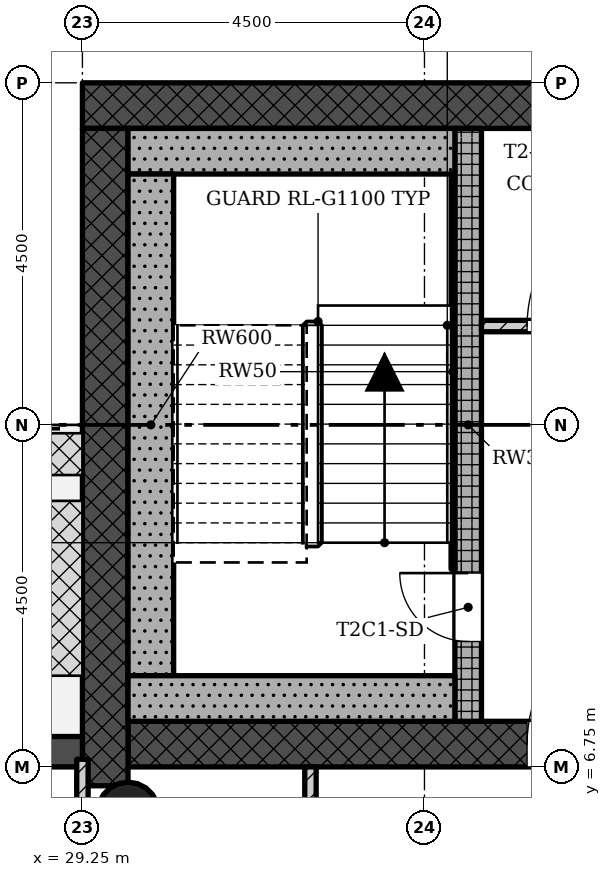
"""IFC4 building model, lengths in metres.
Left out: names, types, materials, properties, quantities, classifications, styles, units other than length and angle.
Written with IfcOpenShell. Run it as: python <this file> out.ifc"""

import sys

from ifc_helpers import new_model, si_unit, direction, frame, frame_2d, origin, origin_2d, place, context, subcontext, project, spatial, rectangle, hollow_circle, extrude, element, fill, save


model = new_model("IFC4")
c1 = context("Model", 3, precision=1e-05, world=origin(), true_north=direction((0.0, 1.0)))
c2 = subcontext(c1, "Body", "Model", "MODEL_VIEW")
j1 = project(units=[si_unit("LENGTHUNIT", "METRE"), si_unit("PLANEANGLEUNIT", "RADIAN")], contexts=[c1])
p1 = place(None, origin())
s1 = spatial("IfcSite", under=j1, at=p1, CompositionType="ELEMENT")
p2 = place(p1, origin())
s2 = spatial("IfcBuilding", under=s1, at=p2, CompositionType="ELEMENT")
p3 = place(p2, frame((0.0, 0.0, 242.4)))
s3 = spatial("IfcBuildingStorey", under=s2, at=p3, CompositionType="ELEMENT", Elevation=242.4)
p4 = place(p3, frame((29.85, 7.05, 0.0), z_axis=(0.0, 0.0, 1.0), x_axis=(1.0, 0.0, 0.0)))
e1 = element("IfcWall", 1, at=p4, inside=s3, PredefinedType="SHEAR", context=c2, shape_type="SweptSolid", body=[
    extrude(rectangle(XDim=12.9, YDim=0.6, at=frame_2d((6.45, 0.0))), origin(), (0.0, 0.0, 1.0), 4.5),
])
p5 = place(p4, frame((5.25, 0.0, 0.0)))
e2 = element("IfcOpeningElement", 2, at=p5, cuts=e1, PredefinedType="OPENING", context=c2, shape_type="SweptSolid", body=[
    extrude(rectangle(XDim=1.8, YDim=2.1, at=frame_2d((0.9, 1.05))), frame((0.0, 0.31, 0.0), z_axis=(0.0, -1.0, 0.0), x_axis=(1.0, 0.0, 0.0)), (0.0, 0.0, 1.0), 0.62),
])
p6 = place(p3, frame((42.15, 15.45, 0.0), z_axis=(0.0, 0.0, 1.0), x_axis=(-1.0, 0.0, 0.0)))
e3 = element("IfcWall", 3, at=p6, inside=s3, PredefinedType="SHEAR", context=c2, shape_type="SweptSolid", body=[
    extrude(rectangle(XDim=12.9, YDim=0.6, at=frame_2d((6.45, 0.0))), origin(), (0.0, 0.0, 1.0), 4.5),
])
p7 = place(p6, frame((5.7, 0.0, 0.45)))
e4 = element("IfcOpeningElement", 4, at=p7, cuts=e3, PredefinedType="OPENING", context=c2, shape_type="SweptSolid", body=[
    extrude(rectangle(XDim=0.9, YDim=2.4, at=frame_2d((0.45, 1.2))), frame((0.0, 0.31, 0.0), z_axis=(0.0, -1.0, 0.0), x_axis=(1.0, 0.0, 0.0)), (0.0, 0.0, 1.0), 0.62),
])
p8 = place(p3, frame((29.55, 15.15, 0.0), z_axis=(0.0, 0.0, 1.0), x_axis=(0.0, -1.0, 0.0)))
e5 = element("IfcWall", 5, at=p8, inside=s3, PredefinedType="SHEAR", context=c2, shape_type="SweptSolid", body=[
    extrude(rectangle(XDim=8.648, YDim=0.6, at=frame_2d((4.324, 0.0))), origin(), (0.0, 0.0, 1.0), 4.5),
])
p9 = place(p3, frame((34.325, 7.35, 0.0), z_axis=(0.0, 0.0, 1.0), x_axis=(0.0, 1.0, 0.0)))
e6 = element("IfcWall", 6, at=p9, inside=s3, PredefinedType="SHEAR", context=c2, shape_type="SweptSolid", body=[
    extrude(rectangle(XDim=7.8, YDim=0.35, at=frame_2d((3.9, 0.0))), origin(), (0.0, 0.0, 1.0), 4.5),
])
p10 = place(p9, frame((1.05, 0.0, 0.0)))
e7 = element("IfcOpeningElement", 7, at=p10, cuts=e6, PredefinedType="OPENING", context=c2, shape_type="SweptSolid", body=[
    extrude(rectangle(XDim=0.9, YDim=2.1, at=frame_2d((0.45, 1.05))), frame((0.0, 0.185, 0.0), z_axis=(0.0, -1.0, 0.0), x_axis=(1.0, 0.0, 0.0)), (0.0, 0.0, 1.0), 0.37),
])
p11 = place(p3, frame((29.85, 6.15, 0.0), z_axis=(0.0, 0.0, 1.0), x_axis=(1.0, 0.0, 0.0)))
e8 = element("IfcColumn", 8, at=p11, inside=s3, PredefinedType="COLUMN", context=c2, shape_type="SweptSolid", body=[
    extrude(hollow_circle(Radius=0.4, WallThickness=0.028, at=origin_2d()), origin(), (0.0, 0.0, 1.0), 4.5),
])
p12 = place(p3, frame((29.25, 6.95, -0.02), z_axis=(0.0, 0.0, 1.0), x_axis=(-1.0, 0.0, 0.0)))
e9 = element("IfcWall", 9, at=p12, inside=s3, PredefinedType="STANDARD", context=c2, shape_type="SweptSolid", body=[
    extrude(rectangle(XDim=4.5, YDim=0.4, at=frame_2d((2.25, 0.0))), origin(), (0.0, 0.0, 1.0), 4.22),
])
p13 = place(p12, frame((1.35, 0.0, 0.02)))
e10 = element("IfcOpeningElement", 10, at=p13, cuts=e9, PredefinedType="OPENING", context=c2, shape_type="SweptSolid", body=[
    extrude(rectangle(XDim=1.8, YDim=2.1, at=frame_2d((0.9, 1.05))), frame((0.0, 0.21, 0.0), z_axis=(0.0, -1.0, 0.0), x_axis=(1.0, 0.0, 0.0)), (0.0, 0.0, 1.0), 0.42),
])
p14 = place(p3, frame((37.5, 12.55, 0.0), z_axis=(0.0, 0.0, 1.0), x_axis=(-1.0, 0.0, 0.0)))
e11 = element("IfcWall", 11, at=p14, inside=s3, PredefinedType="PARTITIONING", context=c2, shape_type="SweptSolid", body=[
    extrude(rectangle(XDim=3.0, YDim=0.15, at=frame_2d((1.5, 0.0))), origin(), (0.0, 0.0, 1.0), 4.08),
])
p15 = place(p14, frame((0.6, 0.0, 0.0)))
e12 = element("IfcOpeningElement", 12, at=p15, cuts=e11, PredefinedType="OPENING", context=c2, shape_type="SweptSolid", body=[
    extrude(rectangle(XDim=1.8, YDim=2.1, at=frame_2d((0.9, 1.05))), frame((0.0, 0.085, 0.0), z_axis=(0.0, -1.0, 0.0), x_axis=(1.0, 0.0, 0.0)), (0.0, 0.0, 1.0), 0.17),
])
p16 = place(p3, frame((32.25, 2.25, 0.0), z_axis=(0.0, 0.0, 1.0), x_axis=(0.0, 1.0, 0.0)))
e13 = element("IfcWall", 13, at=p16, inside=s3, PredefinedType="PARTITIONING", context=c2, shape_type="SweptSolid", body=[
    extrude(rectangle(XDim=4.5, YDim=0.15, at=frame_2d((2.25, 0.0))), origin(), (0.0, 0.0, 1.0), 4.08),
])
p17 = place(p3, frame((29.25, -6.85, 0.0), z_axis=(0.0, 0.0, 1.0), x_axis=(0.0, 1.0, 0.0)))
e14 = element("IfcWall", 14, at=p17, inside=s3, PredefinedType="PARTITIONING", context=c2, shape_type="SweptSolid", body=[
    extrude(rectangle(XDim=13.7, YDim=0.15, at=frame_2d((6.85, 0.0))), origin(), (0.0, 0.0, 1.0), 4.08),
])
p18 = place(p17, frame((5.95, 0.0, 0.0)))
e15 = element("IfcOpeningElement", 15, at=p18, cuts=e14, PredefinedType="OPENING", context=c2, shape_type="SweptSolid", body=[
    extrude(rectangle(XDim=1.8, YDim=2.1, at=frame_2d((0.9, 1.05))), frame((0.0, 0.085, 0.0), z_axis=(0.0, -1.0, 0.0), x_axis=(1.0, 0.0, 0.0)), (0.0, 0.0, 1.0), 0.17),
])
p19 = place(p3, frame((34.15, 14.85, 0.0), z_axis=(0.0, 0.0, 1.0), x_axis=(-1.0, 0.0, 0.0)))
e16 = element("IfcWall", 16, at=p19, inside=s3, PredefinedType="SHEAR", context=c2, shape_type="SweptSolid", body=[
    extrude(rectangle(XDim=4.3, YDim=0.6, at=frame_2d((2.15, 0.0))), origin(), (0.0, 0.0, 1.0), 4.5),
])
p20 = place(p3, frame((30.15, 7.95, 0.0), z_axis=(0.0, 0.0, 1.0), x_axis=(0.0, 1.0, 0.0)))
e17 = element("IfcWall", 17, at=p20, inside=s3, PredefinedType="SHEAR", context=c2, shape_type="SweptSolid", body=[
    extrude(rectangle(XDim=6.6, YDim=0.6, at=frame_2d((3.3, 0.0))), origin(), (0.0, 0.0, 1.0), 4.5),
])
p21 = place(p3, frame((34.15, 7.65, 0.0), z_axis=(0.0, 0.0, 1.0), x_axis=(-1.0, 0.0, 0.0)))
e18 = element("IfcWall", 18, at=p21, inside=s3, PredefinedType="SHEAR", context=c2, shape_type="SweptSolid", body=[
    extrude(rectangle(XDim=4.3, YDim=0.6, at=frame_2d((2.15, 0.0))), origin(), (0.0, 0.0, 1.0), 4.5),
])
p22 = place(p3, frame((34.125, 9.35, 0.0), z_axis=(0.0, 0.0, 1.0), x_axis=(0.0, 1.0, 0.0)))
e19 = element("IfcWall", 19, at=p22, inside=s3, PredefinedType="SHEAR", context=c2, shape_type="SweptSolid", body=[
    extrude(rectangle(XDim=5.2, YDim=0.05, at=frame_2d((2.6, 0.0))), origin(), (0.0, 0.0, 1.0), 4.5),
])
p23 = place(p15, origin())
e20 = element("IfcDoor", 20, at=p23, inside=s3, OperationType="SINGLE_SWING_LEFT", PredefinedType="DOOR", context=c2, shape_type="SweptSolid", body=[
    extrude(rectangle(XDim=1.8, YDim=2.1, at=frame_2d((0.9, 1.05))), frame((0.0, 0.025, 0.0), z_axis=(0.0, -1.0, 0.0), x_axis=(1.0, 0.0, 0.0)), (0.0, 0.0, 1.0), 0.05),
])
fill(e12, e20)
p24 = place(p10, origin())
e21 = element("IfcDoor", 21, at=p24, inside=s3, OperationType="SINGLE_SWING_LEFT", PredefinedType="DOOR", context=c2, shape_type="SweptSolid", body=[
    extrude(rectangle(XDim=0.9, YDim=2.1, at=frame_2d((0.45, 1.05))), frame((0.0, 0.025, 0.0), z_axis=(0.0, -1.0, 0.0), x_axis=(1.0, 0.0, 0.0)), (0.0, 0.0, 1.0), 0.05),
])
fill(e7, e21)
p25 = place(p5, origin())
e22 = element("IfcDoor", 22, at=p25, inside=s3, OperationType="SINGLE_SWING_LEFT", PredefinedType="DOOR", context=c2, shape_type="SweptSolid", body=[
    extrude(rectangle(XDim=1.8, YDim=2.1, at=frame_2d((0.9, 1.05))), frame((0.0, 0.025, 0.0), z_axis=(0.0, -1.0, 0.0), x_axis=(1.0, 0.0, 0.0)), (0.0, 0.0, 1.0), 0.05),
])
fill(e2, e22)
save(model, sys.argv[1])
